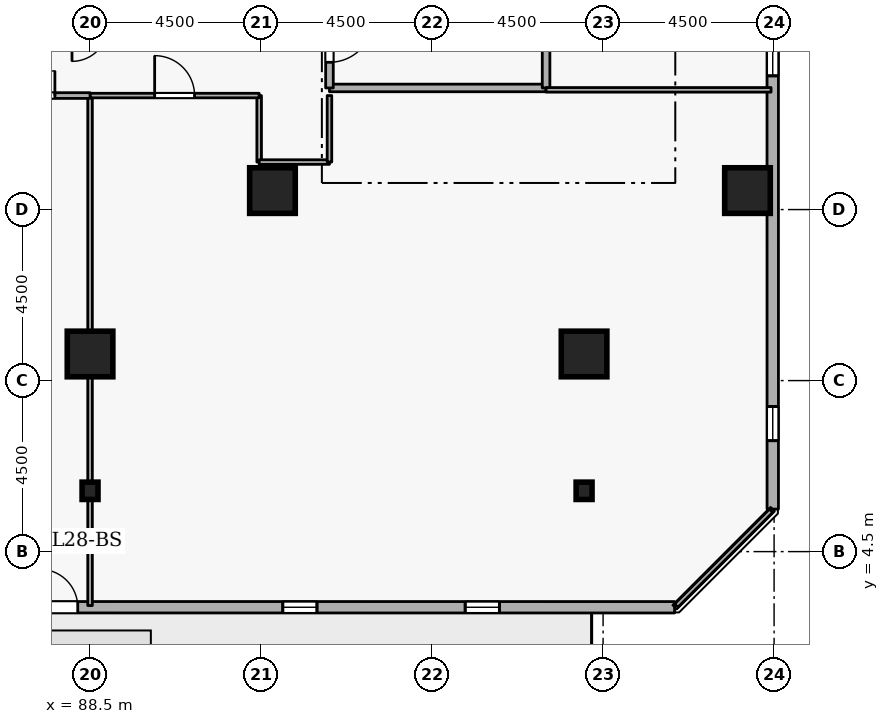
"""IFC4 building model, lengths in metres.
Left out: names, types, materials, properties, quantities, classifications, styles, units other than length and angle.
Written with IfcOpenShell. Run it as: python <this file> out.ifc"""

import sys

from ifc_helpers import new_model, si_unit, direction, frame, frame_2d, origin, origin_2d, place, context, subcontext, project, spatial, rectangle, i_section, extrude, element, fill, save


model = new_model("IFC4")
c1 = context("Model", 3, precision=1e-05, world=origin(), true_north=direction((0.0, 1.0)))
c2 = subcontext(c1, "Body", "Model", "MODEL_VIEW")
j1 = project(units=[si_unit("LENGTHUNIT", "METRE"), si_unit("PLANEANGLEUNIT", "RADIAN")], contexts=[c1])
p1 = place(None, origin())
s1 = spatial("IfcSite", under=j1, at=p1, CompositionType="ELEMENT")
p2 = place(p1, origin())
s2 = spatial("IfcBuilding", under=s1, at=p2, CompositionType="ELEMENT")
p3 = place(p2, frame((0.0, 0.0, 108.9)))
s3 = spatial("IfcBuildingStorey", under=s2, at=p3, CompositionType="ELEMENT", Elevation=108.9)
for number, where, z_axis, x_axis in (
    (1, (105.8, 14.0, 0.0), (0.0, 0.0, 1.0), (1.0, 0.0, 0.0)),
    (2, (101.5, 9.7, 0.0), (0.0, 0.0, 1.0), (1.0, 0.0, 0.0)),
    (3, (88.5, 9.7, 0.0), (0.0, 0.0, 1.0), (1.0, 0.0, 0.0)),
    (4, (93.3, 14.0, 0.0), (0.0, 0.0, 1.0), (1.0, 0.0, 0.0)),
):
    element("IfcColumn", number, at=place(p3, frame(where, z_axis=z_axis, x_axis=x_axis)), inside=s3, PredefinedType="COLUMN", context=c2, shape_type="SweptSolid", body=[
        extrude(rectangle(XDim=1.2, YDim=1.2, at=origin_2d()), origin(), (0.0, 0.0, 1.0), 3.6),
    ])
for number, where, z_axis, x_axis in (
    (5, (101.5, 6.1, 0.0), (0.0, 0.0, 1.0), (1.0, 0.0, 0.0)),
    (6, (88.5, 6.1, 0.0), (0.0, 0.0, 1.0), (1.0, 0.0, 0.0)),
):
    element("IfcColumn", number, at=place(p3, frame(where, z_axis=z_axis, x_axis=x_axis)), inside=s3, PredefinedType="COLUMN", context=c2, shape_type="SweptSolid", body=[
        extrude(i_section(OverallWidth=0.418, OverallDepth=0.456, WebThickness=0.042, FlangeThickness=0.067, FilletRadius=0.015, at=origin_2d()), origin(), (0.0, 0.0, 1.0), 3.6),
    ])
p4 = place(p3, frame((67.771, 3.037, 0.0), z_axis=(0.0, 0.0, 1.0), x_axis=(0.999999998537, -5.4088042e-05, 0.0)))
e7 = element("IfcWall", 7, at=p4, inside=s3, PredefinedType="STANDARD", context=c2, shape_type="SweptSolid", body=[
    extrude(rectangle(XDim=36.11, YDim=0.3, at=frame_2d((18.055, 0.0))), origin(), (0.0, 0.0, 1.0), 2.7),
])
p5 = place(p4, frame((19.405, 0.0, 0.0)))
e8 = element("IfcOpeningElement", 8, at=p5, cuts=e7, PredefinedType="OPENING", context=c2, shape_type="SweptSolid", body=[
    extrude(rectangle(XDim=1.0, YDim=2.08, at=frame_2d((0.5, 1.04))), frame((0.0, 0.16, 0.0), z_axis=(0.0, -1.0, 0.0), x_axis=(1.0, 0.0, 0.0)), (0.0, 0.0, 1.0), 0.32),
])
p6 = place(p4, frame((1.8, 0.0, 0.72)))
e9 = element("IfcOpeningElement", 9, at=p6, cuts=e7, PredefinedType="OPENING", context=c2, shape_type="SweptSolid", body=[
    extrude(rectangle(XDim=0.9, YDim=1.75, at=frame_2d((0.45, 0.875))), frame((0.0, 0.16, 0.0), z_axis=(0.0, -1.0, 0.0), x_axis=(1.0, 0.0, 0.0)), (0.0, 0.0, 1.0), 0.32),
])
p7 = place(p4, frame((11.4, 0.0, 0.72)))
e10 = element("IfcOpeningElement", 10, at=p7, cuts=e7, PredefinedType="OPENING", context=c2, shape_type="SweptSolid", body=[
    extrude(rectangle(XDim=0.9, YDim=1.75, at=frame_2d((0.45, 0.875))), frame((0.0, 0.16, 0.0), z_axis=(0.0, -1.0, 0.0), x_axis=(1.0, 0.0, 0.0)), (0.0, 0.0, 1.0), 0.32),
])
p8 = place(p4, frame((16.2, 0.0, 0.72)))
e11 = element("IfcOpeningElement", 11, at=p8, cuts=e7, PredefinedType="OPENING", context=c2, shape_type="SweptSolid", body=[
    extrude(rectangle(XDim=0.9, YDim=1.75, at=frame_2d((0.45, 0.875))), frame((0.0, 0.16, 0.0), z_axis=(0.0, -1.0, 0.0), x_axis=(1.0, 0.0, 0.0)), (0.0, 0.0, 1.0), 0.32),
])
p9 = place(p4, frame((25.8, 0.0, 0.72)))
e12 = element("IfcOpeningElement", 12, at=p9, cuts=e7, PredefinedType="OPENING", context=c2, shape_type="SweptSolid", body=[
    extrude(rectangle(XDim=0.9, YDim=1.75, at=frame_2d((0.45, 0.875))), frame((0.0, 0.16, 0.0), z_axis=(0.0, -1.0, 0.0), x_axis=(1.0, 0.0, 0.0)), (0.0, 0.0, 1.0), 0.32),
])
p10 = place(p4, frame((30.6, 0.0, 0.72)))
e13 = element("IfcOpeningElement", 13, at=p10, cuts=e7, PredefinedType="OPENING", context=c2, shape_type="SweptSolid", body=[
    extrude(rectangle(XDim=0.9, YDim=1.75, at=frame_2d((0.45, 0.875))), frame((0.0, 0.16, 0.0), z_axis=(0.0, -1.0, 0.0), x_axis=(1.0, 0.0, 0.0)), (0.0, 0.0, 1.0), 0.32),
])
p11 = place(p3, frame((106.465, 5.619, 0.0), z_axis=(0.0, 0.0, 1.0), x_axis=(-5.4088042e-05, 0.999999998537, 0.0)))
e14 = element("IfcWall", 14, at=p11, inside=s3, PredefinedType="STANDARD", context=c2, shape_type="SweptSolid", body=[
    extrude(rectangle(XDim=36.11, YDim=0.3, at=frame_2d((18.055, 0.0))), origin(), (0.0, 0.0, 1.0), 2.7),
])
p12 = place(p11, frame((1.8, 0.0, 0.72)))
e15 = element("IfcOpeningElement", 15, at=p12, cuts=e14, PredefinedType="OPENING", context=c2, shape_type="SweptSolid", body=[
    extrude(rectangle(XDim=0.9, YDim=1.75, at=frame_2d((0.45, 0.875))), frame((0.0, 0.16, 0.0), z_axis=(0.0, -1.0, 0.0), x_axis=(1.0, 0.0, 0.0)), (0.0, 0.0, 1.0), 0.32),
])
p13 = place(p11, frame((11.4, 0.0, 0.72)))
e16 = element("IfcOpeningElement", 16, at=p13, cuts=e14, PredefinedType="OPENING", context=c2, shape_type="SweptSolid", body=[
    extrude(rectangle(XDim=0.9, YDim=1.75, at=frame_2d((0.45, 0.875))), frame((0.0, 0.16, 0.0), z_axis=(0.0, -1.0, 0.0), x_axis=(1.0, 0.0, 0.0)), (0.0, 0.0, 1.0), 0.32),
])
p14 = place(p11, frame((16.2, 0.0, 0.72)))
e17 = element("IfcOpeningElement", 17, at=p14, cuts=e14, PredefinedType="OPENING", context=c2, shape_type="SweptSolid", body=[
    extrude(rectangle(XDim=0.9, YDim=1.75, at=frame_2d((0.45, 0.875))), frame((0.0, 0.16, 0.0), z_axis=(0.0, -1.0, 0.0), x_axis=(1.0, 0.0, 0.0)), (0.0, 0.0, 1.0), 0.32),
])
p15 = place(p11, frame((25.8, 0.0, 0.72)))
e18 = element("IfcOpeningElement", 18, at=p15, cuts=e14, PredefinedType="OPENING", context=c2, shape_type="SweptSolid", body=[
    extrude(rectangle(XDim=0.9, YDim=1.75, at=frame_2d((0.45, 0.875))), frame((0.0, 0.16, 0.0), z_axis=(0.0, -1.0, 0.0), x_axis=(1.0, 0.0, 0.0)), (0.0, 0.0, 1.0), 0.32),
])
p16 = place(p11, frame((30.6, 0.0, 0.72)))
e19 = element("IfcOpeningElement", 19, at=p16, cuts=e14, PredefinedType="OPENING", context=c2, shape_type="SweptSolid", body=[
    extrude(rectangle(XDim=0.9, YDim=1.75, at=frame_2d((0.45, 0.875))), frame((0.0, 0.16, 0.0), z_axis=(0.0, -1.0, 0.0), x_axis=(1.0, 0.0, 0.0)), (0.0, 0.0, 1.0), 0.32),
])
p17 = place(p3, frame((94.8, 16.7, 0.0), z_axis=(0.0, 0.0, 1.0), x_axis=(1.0, 0.0, 0.0)))
e20 = element("IfcWall", 20, at=p17, inside=s3, PredefinedType="STANDARD", context=c2, shape_type="SweptSolid", body=[
    extrude(rectangle(XDim=5.7, YDim=0.2, at=frame_2d((2.85, 0.0))), origin(), (0.0, 0.0, 1.0), 3.34),
])
p18 = place(p3, frame((100.5, 16.7, 0.0), z_axis=(0.0, 0.0, 1.0), x_axis=(0.0, 1.0, 0.0)))
e21 = element("IfcWall", 21, at=p18, inside=s3, PredefinedType="STANDARD", context=c2, shape_type="SweptSolid", body=[
    extrude(rectangle(XDim=2.5, YDim=0.2, at=frame_2d((1.25, 0.0))), origin(), (0.0, 0.0, 1.0), 3.34),
])
p19 = place(p3, frame((94.8, 19.2, 0.0), z_axis=(0.0, 0.0, 1.0), x_axis=(0.0, -1.0, 0.0)))
e22 = element("IfcWall", 22, at=p19, inside=s3, PredefinedType="STANDARD", context=c2, shape_type="SweptSolid", body=[
    extrude(rectangle(XDim=2.5, YDim=0.2, at=frame_2d((1.25, 0.0))), origin(), (0.0, 0.0, 1.0), 3.34),
])
p20 = place(p19, frame((0.675, 0.0, 0.0)))
e23 = element("IfcOpeningElement", 23, at=p20, cuts=e22, PredefinedType="OPENING", context=c2, shape_type="SweptSolid", body=[
    extrude(rectangle(XDim=1.15, YDim=2.1, at=frame_2d((0.575, 1.05))), frame((0.0, 0.11, 0.0), z_axis=(0.0, -1.0, 0.0), x_axis=(1.0, 0.0, 0.0)), (0.0, 0.0, 1.0), 0.22),
])
p21 = place(p3, frame((92.95, 16.5, 0.0), z_axis=(0.0, 0.0, 1.0), x_axis=(0.0, -1.0, 0.0)))
e24 = element("IfcWall", 24, at=p21, inside=s3, PredefinedType="PARTITIONING", context=c2, shape_type="SweptSolid", body=[
    extrude(rectangle(XDim=1.75, YDim=0.12, at=frame_2d((0.875, 0.0))), origin(), (0.0, 0.0, 1.0), 3.34),
])
p22 = place(p3, frame((92.95, 14.75, 0.0), z_axis=(0.0, 0.0, 1.0), x_axis=(1.0, 0.0, 0.0)))
e25 = element("IfcWall", 25, at=p22, inside=s3, PredefinedType="PARTITIONING", context=c2, shape_type="SweptSolid", body=[
    extrude(rectangle(XDim=1.85, YDim=0.12, at=frame_2d((0.925, 0.0))), origin(), (0.0, 0.0, 1.0), 3.34),
])
p23 = place(p3, frame((94.8, 14.75, 0.0), z_axis=(0.0, 0.0, 1.0), x_axis=(0.0, 1.0, 0.0)))
e26 = element("IfcWall", 26, at=p23, inside=s3, PredefinedType="PARTITIONING", context=c2, shape_type="SweptSolid", body=[
    extrude(rectangle(XDim=1.75, YDim=0.12, at=frame_2d((0.875, 0.0))), origin(), (0.0, 0.0, 1.0), 3.34),
])
p24 = place(p3, frame((100.5, 16.65, 0.0), z_axis=(0.0, 0.0, 1.0), x_axis=(1.0, 0.0, 0.0)))
e27 = element("IfcWall", 27, at=p24, inside=s3, PredefinedType="PARTITIONING", context=c2, shape_type="SweptSolid", body=[
    extrude(rectangle(XDim=5.92, YDim=0.12, at=frame_2d((2.96, 0.0))), origin(), (0.0, 0.0, 1.0), 3.34),
])
p25 = place(p3, frame((106.42, 5.575, 0.0), z_axis=(0.0, 0.0, 1.0), x_axis=(-0.707106781187, -0.707106781187, 0.0)))
e28 = element("IfcWall", 28, at=p25, inside=s3, PredefinedType="PARTITIONING", context=c2, shape_type="SweptSolid", body=[
    extrude(rectangle(XDim=3.528, YDim=0.12, at=frame_2d((1.764, 0.0))), origin(), (0.0, 0.0, 1.0), 3.34),
])
p26 = place(p3, frame((88.5, 3.08, 0.0), z_axis=(0.0, 0.0, 1.0), x_axis=(0.0, 1.0, 0.0)))
e29 = element("IfcWall", 29, at=p26, inside=s3, PredefinedType="PARTITIONING", context=c2, shape_type="SweptSolid", body=[
    extrude(rectangle(XDim=13.42, YDim=0.12, at=frame_2d((6.71, 0.0))), origin(), (0.0, 0.0, 1.0), 2.882),
])
p27 = place(p3, frame((88.5, 16.5, 0.0), z_axis=(0.0, 0.0, 1.0), x_axis=(1.0, 0.0, 0.0)))
e30 = element("IfcWall", 30, at=p27, inside=s3, PredefinedType="PARTITIONING", context=c2, shape_type="SweptSolid", body=[
    extrude(rectangle(XDim=4.45, YDim=0.12, at=frame_2d((2.225, 0.0))), origin(), (0.0, 0.0, 1.0), 3.34),
])
p28 = place(p27, frame((1.7, 0.0, 0.0)))
e31 = element("IfcOpeningElement", 31, at=p28, cuts=e30, PredefinedType="OPENING", context=c2, shape_type="SweptSolid", body=[
    extrude(rectangle(XDim=1.05, YDim=2.1, at=frame_2d((0.525, 1.05))), frame((0.0, 0.07, 0.0), z_axis=(0.0, -1.0, 0.0), x_axis=(1.0, 0.0, 0.0)), (0.0, 0.0, 1.0), 0.14),
])
p29 = place(p3, frame((85.35, 16.5, 0.0), z_axis=(0.0, 0.0, 1.0), x_axis=(1.0, 0.0, 0.0)))
e32 = element("IfcWall", 32, at=p29, inside=s3, PredefinedType="PARTITIONING", context=c2, shape_type="SweptSolid", body=[
    extrude(rectangle(XDim=3.15, YDim=0.15, at=frame_2d((1.575, 0.0))), origin(), (0.0, 0.0, 1.0), 3.34),
])
p30 = place(p29, frame((0.925, 0.0, 0.0)))
e33 = element("IfcOpeningElement", 33, at=p30, cuts=e32, PredefinedType="OPENING", context=c2, shape_type="SweptSolid", body=[
    extrude(rectangle(XDim=1.3, YDim=2.12, at=frame_2d((0.65, 1.06))), frame((0.0, 0.085, 0.0), z_axis=(0.0, -1.0, 0.0), x_axis=(1.0, 0.0, 0.0)), (0.0, 0.0, 1.0), 0.17),
])
p31 = place(p5, origin())
e34 = element("IfcDoor", 34, at=p31, inside=s3, OperationType="SINGLE_SWING_LEFT", PredefinedType="DOOR", context=c2, shape_type="SweptSolid", body=[
    extrude(rectangle(XDim=1.0, YDim=2.08, at=frame_2d((0.5, 1.04))), frame((0.0, 0.025, 0.0), z_axis=(0.0, -1.0, 0.0), x_axis=(1.0, 0.0, 0.0)), (0.0, 0.0, 1.0), 0.05),
])
fill(e8, e34)
p32 = place(p9, origin())
e35 = element("IfcWindow", 35, at=p32, inside=s3, PartitioningType="SINGLE_PANEL", PredefinedType="WINDOW", context=c2, shape_type="SweptSolid", body=[
    extrude(rectangle(XDim=0.9, YDim=1.75, at=frame_2d((0.45, 0.875))), frame((0.0, 0.03, 0.0), z_axis=(0.0, -1.0, 0.0), x_axis=(1.0, 0.0, 0.0)), (0.0, 0.0, 1.0), 0.06),
])
fill(e12, e35)
p33 = place(p10, origin())
e36 = element("IfcWindow", 36, at=p33, inside=s3, PartitioningType="SINGLE_PANEL", PredefinedType="WINDOW", context=c2, shape_type="SweptSolid", body=[
    extrude(rectangle(XDim=0.9, YDim=1.75, at=frame_2d((0.45, 0.875))), frame((0.0, 0.03, 0.0), z_axis=(0.0, -1.0, 0.0), x_axis=(1.0, 0.0, 0.0)), (0.0, 0.0, 1.0), 0.06),
])
fill(e13, e36)
p34 = place(p12, origin())
e37 = element("IfcWindow", 37, at=p34, inside=s3, PartitioningType="SINGLE_PANEL", PredefinedType="WINDOW", context=c2, shape_type="SweptSolid", body=[
    extrude(rectangle(XDim=0.9, YDim=1.75, at=frame_2d((0.45, 0.875))), frame((0.0, 0.03, 0.0), z_axis=(0.0, -1.0, 0.0), x_axis=(1.0, 0.0, 0.0)), (0.0, 0.0, 1.0), 0.06),
])
fill(e15, e37)
p35 = place(p13, origin())
e38 = element("IfcWindow", 38, at=p35, inside=s3, PartitioningType="SINGLE_PANEL", PredefinedType="WINDOW", context=c2, shape_type="SweptSolid", body=[
    extrude(rectangle(XDim=0.9, YDim=1.75, at=frame_2d((0.45, 0.875))), frame((0.0, 0.03, 0.0), z_axis=(0.0, -1.0, 0.0), x_axis=(1.0, 0.0, 0.0)), (0.0, 0.0, 1.0), 0.06),
])
fill(e16, e38)
p36 = place(p20, origin())
e39 = element("IfcDoor", 39, at=p36, inside=s3, OperationType="SINGLE_SWING_LEFT", PredefinedType="DOOR", context=c2, shape_type="SweptSolid", body=[
    extrude(rectangle(XDim=1.15, YDim=2.1, at=frame_2d((0.575, 1.05))), frame((0.0, 0.025, 0.0), z_axis=(0.0, -1.0, 0.0), x_axis=(1.0, 0.0, 0.0)), (0.0, 0.0, 1.0), 0.05),
])
fill(e23, e39)
p37 = place(p28, origin())
e40 = element("IfcDoor", 40, at=p37, inside=s3, OperationType="SINGLE_SWING_LEFT", PredefinedType="DOOR", context=c2, shape_type="SweptSolid", body=[
    extrude(rectangle(XDim=1.05, YDim=2.1, at=frame_2d((0.525, 1.05))), frame((0.0, 0.025, 0.0), z_axis=(0.0, -1.0, 0.0), x_axis=(1.0, 0.0, 0.0)), (0.0, 0.0, 1.0), 0.05),
])
fill(e31, e40)
p38 = place(p30, origin())
e41 = element("IfcDoor", 41, at=p38, inside=s3, OperationType="DOUBLE_DOOR_SINGLE_SWING", PredefinedType="DOOR", context=c2, shape_type="SweptSolid", body=[
    extrude(rectangle(XDim=1.3, YDim=2.12, at=frame_2d((0.65, 1.06))), frame((0.0, 0.025, 0.0), z_axis=(0.0, -1.0, 0.0), x_axis=(1.0, 0.0, 0.0)), (0.0, 0.0, 1.0), 0.05),
])
fill(e33, e41)
save(model, sys.argv[1])
